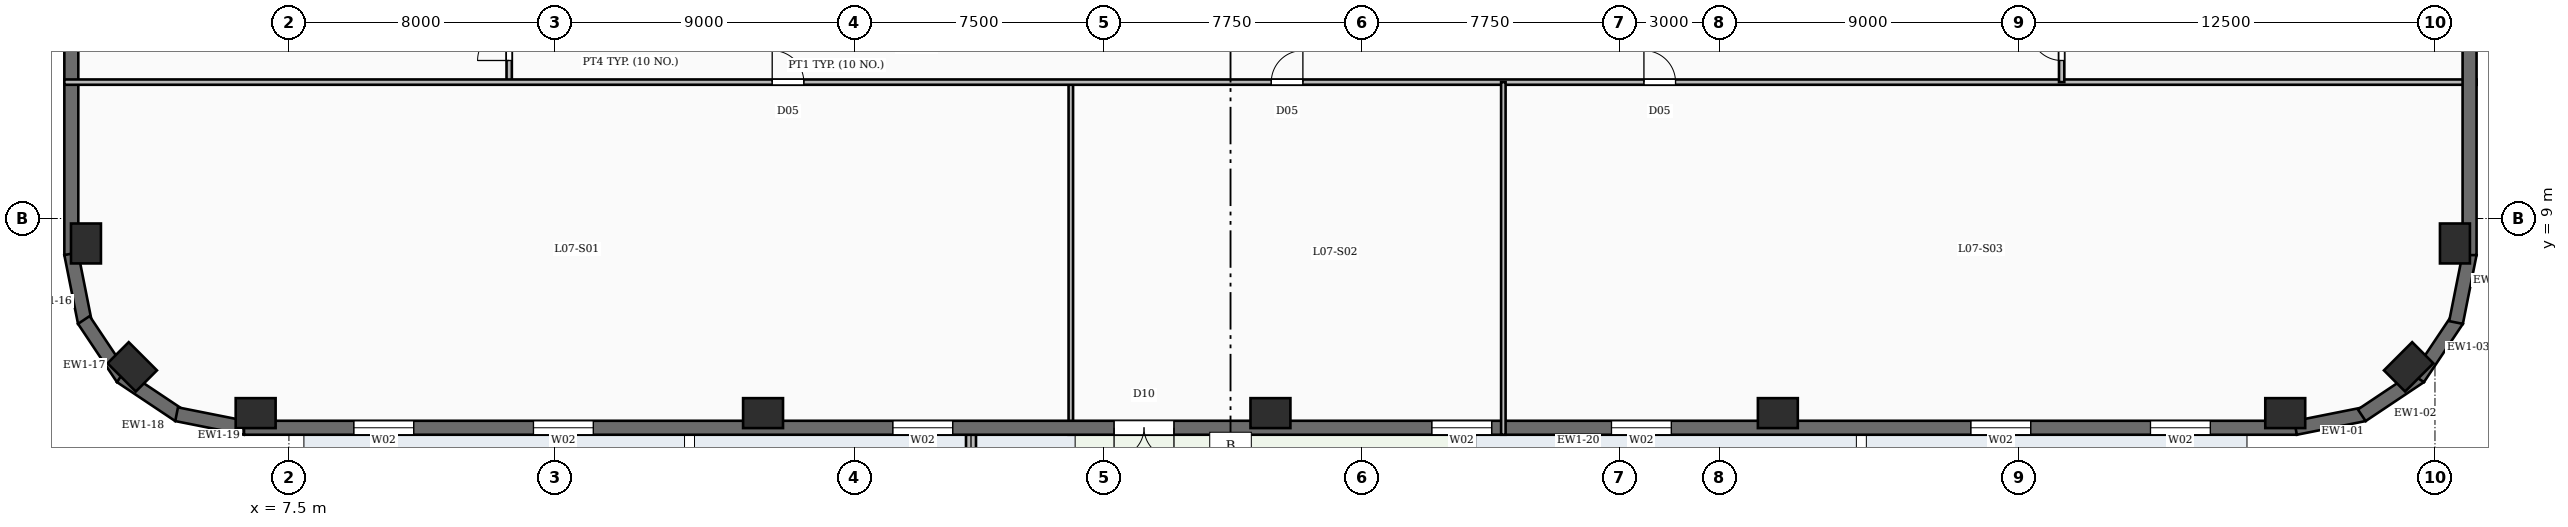
"""IFC4 building model, lengths in metres.
Left out: names, types, materials, properties, quantities, classifications, styles, units other than length and angle.
Written with IfcOpenShell. Run it as: python <this file> out.ifc"""

import sys

from ifc_helpers import new_model, si_unit, direction, frame, frame_2d, origin, origin_2d, place, context, subcontext, project, spatial, rectangle, extrude, element, fill, save


model = new_model("IFC4")
c1 = context("Model", 3, precision=1e-05, world=origin(), true_north=direction((0.0, 1.0)))
c2 = subcontext(c1, "Body", "Model", "MODEL_VIEW")
j1 = project(units=[si_unit("LENGTHUNIT", "METRE"), si_unit("PLANEANGLEUNIT", "RADIAN")], contexts=[c1])
p1 = place(None, origin())
s1 = spatial("IfcSite", under=j1, at=p1, CompositionType="ELEMENT")
p2 = place(p1, origin())
s2 = spatial("IfcBuilding", under=s1, at=p2, CompositionType="ELEMENT")
p3 = place(p2, frame((0.0, 0.0, 42.0)))
s3 = spatial("IfcBuildingStorey", under=s2, at=p3, CompositionType="ELEMENT", Elevation=42.0)
for number, where, z_axis, x_axis in (
    (1, (6.5, 3.15, -0.45), (0.0, 0.0, 1.0), (1.0, 0.0, 0.0)),
    (2, (21.75, 3.15, -0.45), (0.0, 0.0, 1.0), (1.0, 0.0, 0.0)),
    (3, (37.0, 3.15, -0.45), (0.0, 0.0, 1.0), (1.0, 0.0, 0.0)),
    (4, (52.25, 3.15, -0.45), (0.0, 0.0, 1.0), (1.0, 0.0, 0.0)),
    (5, (67.5, 3.15, -0.45), (0.0, 0.0, 1.0), (1.0, 0.0, 0.0)),
    (6, (71.209, 4.541, -0.45), (0.0, 0.0, 1.0), (0.707, 0.707, 0.0)),
    (7, (72.6, 8.25, -0.45), (0.0, 0.0, 1.0), (0.0, 1.0, 0.0)),
    (8, (1.4, 8.25, -0.45), (0.0, 0.0, 1.0), (0.0, 1.0, 0.0)),
    (9, (2.791, 4.541, -0.45), (0.0, 0.0, 1.0), (-0.707, 0.707, 0.0)),
):
    element("IfcColumn", number, at=place(p3, frame(where, z_axis=z_axis, x_axis=x_axis)), inside=s3, PredefinedType="COLUMN", context=c2, shape_type="SweptSolid", body=[
        extrude(rectangle(XDim=1.2, YDim=0.9, at=origin_2d()), origin(), (0.0, 0.0, 1.0), 3.93),
    ])
for number, where, z_axis, x_axis in (
    (10, (69.875, 3.117, 0.0), (0.0, 0.0, 1.0), (-0.981, -0.195, 0.0)),
    (11, (71.552, 4.256, 0.0), (0.0, 0.0, 1.0), (-0.832, -0.556, 0.0)),
    (12, (72.664, 5.95, 0.0), (0.0, 0.0, 1.0), (-0.556, -0.832, 0.0)),
    (13, (73.044, 7.941, 0.0), (0.0, 0.0, 1.0), (-0.195, -0.981, 0.0)),
):
    element("IfcWall", number, at=place(p3, frame(where, z_axis=z_axis, x_axis=x_axis)), inside=s3, PredefinedType="SOLIDWALL", context=c2, shape_type="SweptSolid", body=[
        extrude(rectangle(XDim=2.107, YDim=0.42, at=frame_2d((1.053, 0.0))), origin(), (0.0, 0.0, 1.0), 3.48),
    ])
p4 = place(p3, frame((73.04, 44.1, 0.0), z_axis=(0.0, 0.0, 1.0), x_axis=(0.0, -1.0, 0.0)))
e14 = element("IfcWall", 14, at=p4, inside=s3, PredefinedType="SOLIDWALL", context=c2, shape_type="SweptSolid", body=[
    extrude(rectangle(XDim=36.2, YDim=0.42, at=frame_2d((18.1, 0.0))), origin(), (0.0, 0.0, 1.0), 3.48),
])
p5 = place(p4, frame((4.2, 0.0, 0.88)))
e15 = element("IfcOpeningElement", 15, at=p5, cuts=e14, PredefinedType="OPENING", context=c2, shape_type="SweptSolid", body=[
    extrude(rectangle(XDim=1.35, YDim=2.2, at=frame_2d((0.675, 1.1))), frame((0.0, 0.22, 0.0), z_axis=(0.0, -1.0, 0.0), x_axis=(1.0, 0.0, 0.0)), (0.0, 0.0, 1.0), 0.44),
])
p6 = place(p4, frame((15.4, 0.0, 0.88)))
e16 = element("IfcOpeningElement", 16, at=p6, cuts=e14, PredefinedType="OPENING", context=c2, shape_type="SweptSolid", body=[
    extrude(rectangle(XDim=1.35, YDim=2.2, at=frame_2d((0.675, 1.1))), frame((0.0, 0.22, 0.0), z_axis=(0.0, -1.0, 0.0), x_axis=(1.0, 0.0, 0.0)), (0.0, 0.0, 1.0), 0.44),
])
p7 = place(p4, frame((21.0, 0.0, 0.88)))
e17 = element("IfcOpeningElement", 17, at=p7, cuts=e14, PredefinedType="OPENING", context=c2, shape_type="SweptSolid", body=[
    extrude(rectangle(XDim=1.35, YDim=2.2, at=frame_2d((0.675, 1.1))), frame((0.0, 0.22, 0.0), z_axis=(0.0, -1.0, 0.0), x_axis=(1.0, 0.0, 0.0)), (0.0, 0.0, 1.0), 0.44),
])
p8 = place(p4, frame((26.6, 0.0, 0.88)))
e18 = element("IfcOpeningElement", 18, at=p8, cuts=e14, PredefinedType="OPENING", context=c2, shape_type="SweptSolid", body=[
    extrude(rectangle(XDim=1.35, YDim=2.2, at=frame_2d((0.675, 1.1))), frame((0.0, 0.22, 0.0), z_axis=(0.0, -1.0, 0.0), x_axis=(1.0, 0.0, 0.0)), (0.0, 0.0, 1.0), 0.44),
])
p9 = place(p3, frame((0.96, 7.9, 0.0), z_axis=(0.0, 0.0, 1.0), x_axis=(0.0, 1.0, 0.0)))
e19 = element("IfcWall", 19, at=p9, inside=s3, PredefinedType="SOLIDWALL", context=c2, shape_type="SweptSolid", body=[
    extrude(rectangle(XDim=36.2, YDim=0.42, at=frame_2d((18.1, 0.0))), origin(), (0.0, 0.0, 1.0), 3.48),
])
p10 = place(p9, frame((15.4, 0.0, 0.88)))
e20 = element("IfcOpeningElement", 20, at=p10, cuts=e19, PredefinedType="OPENING", context=c2, shape_type="SweptSolid", body=[
    extrude(rectangle(XDim=1.35, YDim=2.2, at=frame_2d((0.675, 1.1))), frame((0.0, 0.22, 0.0), z_axis=(0.0, -1.0, 0.0), x_axis=(1.0, 0.0, 0.0)), (0.0, 0.0, 1.0), 0.44),
])
p11 = place(p9, frame((21.0, 0.0, 0.88)))
e21 = element("IfcOpeningElement", 21, at=p11, cuts=e19, PredefinedType="OPENING", context=c2, shape_type="SweptSolid", body=[
    extrude(rectangle(XDim=1.35, YDim=2.2, at=frame_2d((0.675, 1.1))), frame((0.0, 0.22, 0.0), z_axis=(0.0, -1.0, 0.0), x_axis=(1.0, 0.0, 0.0)), (0.0, 0.0, 1.0), 0.44),
])
p12 = place(p9, frame((26.6, 0.0, 0.88)))
e22 = element("IfcOpeningElement", 22, at=p12, cuts=e19, PredefinedType="OPENING", context=c2, shape_type="SweptSolid", body=[
    extrude(rectangle(XDim=1.35, YDim=2.2, at=frame_2d((0.675, 1.1))), frame((0.0, 0.22, 0.0), z_axis=(0.0, -1.0, 0.0), x_axis=(1.0, 0.0, 0.0)), (0.0, 0.0, 1.0), 0.44),
])
for number, where, z_axis, x_axis in (
    (23, (1.367, 5.875, 0.0), (0.0, 0.0, 1.0), (-0.195, 0.981, 0.0)),
    (24, (2.506, 4.198, 0.0), (0.0, 0.0, 1.0), (-0.556, 0.832, 0.0)),
    (25, (4.2, 3.086, 0.0), (0.0, 0.0, 1.0), (-0.832, 0.556, 0.0)),
    (26, (6.191, 2.706, 0.0), (0.0, 0.0, 1.0), (-0.981, 0.195, 0.0)),
):
    element("IfcWall", number, at=place(p3, frame(where, z_axis=z_axis, x_axis=x_axis)), inside=s3, PredefinedType="SOLIDWALL", context=c2, shape_type="SweptSolid", body=[
        extrude(rectangle(XDim=2.107, YDim=0.42, at=frame_2d((1.053, 0.0))), origin(), (0.0, 0.0, 1.0), 3.48),
    ])
p13 = place(p3, frame((67.85, 2.71, 0.0), z_axis=(0.0, 0.0, 1.0), x_axis=(-1.0, 0.0, 0.0)))
e27 = element("IfcWall", 27, at=p13, inside=s3, PredefinedType="SOLIDWALL", context=c2, shape_type="SweptSolid", body=[
    extrude(rectangle(XDim=61.7, YDim=0.42, at=frame_2d((30.85, 0.0))), origin(), (0.0, 0.0, 1.0), 3.48),
])
p14 = place(p13, frame((33.75, 0.0, 0.0)))
e28 = element("IfcOpeningElement", 28, at=p14, cuts=e27, PredefinedType="OPENING", context=c2, shape_type="SweptSolid", body=[
    extrude(rectangle(XDim=1.8, YDim=2.25, at=frame_2d((0.9, 1.125))), frame((0.0, 0.22, 0.0), z_axis=(0.0, -1.0, 0.0), x_axis=(1.0, 0.0, 0.0)), (0.0, 0.0, 1.0), 0.44),
])
p15 = place(p13, frame((2.6, 0.0, 0.88)))
e29 = element("IfcOpeningElement", 29, at=p15, cuts=e27, PredefinedType="OPENING", context=c2, shape_type="SweptSolid", body=[
    extrude(rectangle(XDim=1.8, YDim=2.15, at=frame_2d((0.9, 1.075))), frame((0.0, 0.22, 0.0), z_axis=(0.0, -1.0, 0.0), x_axis=(1.0, 0.0, 0.0)), (0.0, 0.0, 1.0), 0.44),
])
p16 = place(p13, frame((8.0, 0.0, 0.88)))
e30 = element("IfcOpeningElement", 30, at=p16, cuts=e27, PredefinedType="OPENING", context=c2, shape_type="SweptSolid", body=[
    extrude(rectangle(XDim=1.8, YDim=2.15, at=frame_2d((0.9, 1.075))), frame((0.0, 0.22, 0.0), z_axis=(0.0, -1.0, 0.0), x_axis=(1.0, 0.0, 0.0)), (0.0, 0.0, 1.0), 0.44),
])
p17 = place(p13, frame((18.8, 0.0, 0.88)))
e31 = element("IfcOpeningElement", 31, at=p17, cuts=e27, PredefinedType="OPENING", context=c2, shape_type="SweptSolid", body=[
    extrude(rectangle(XDim=1.8, YDim=2.15, at=frame_2d((0.9, 1.075))), frame((0.0, 0.22, 0.0), z_axis=(0.0, -1.0, 0.0), x_axis=(1.0, 0.0, 0.0)), (0.0, 0.0, 1.0), 0.44),
])
p18 = place(p13, frame((24.2, 0.0, 0.88)))
e32 = element("IfcOpeningElement", 32, at=p18, cuts=e27, PredefinedType="OPENING", context=c2, shape_type="SweptSolid", body=[
    extrude(rectangle(XDim=1.8, YDim=2.15, at=frame_2d((0.9, 1.075))), frame((0.0, 0.22, 0.0), z_axis=(0.0, -1.0, 0.0), x_axis=(1.0, 0.0, 0.0)), (0.0, 0.0, 1.0), 0.44),
])
p19 = place(p13, frame((40.4, 0.0, 0.88)))
e33 = element("IfcOpeningElement", 33, at=p19, cuts=e27, PredefinedType="OPENING", context=c2, shape_type="SweptSolid", body=[
    extrude(rectangle(XDim=1.8, YDim=2.15, at=frame_2d((0.9, 1.075))), frame((0.0, 0.22, 0.0), z_axis=(0.0, -1.0, 0.0), x_axis=(1.0, 0.0, 0.0)), (0.0, 0.0, 1.0), 0.44),
])
p20 = place(p13, frame((51.2, 0.0, 0.88)))
e34 = element("IfcOpeningElement", 34, at=p20, cuts=e27, PredefinedType="OPENING", context=c2, shape_type="SweptSolid", body=[
    extrude(rectangle(XDim=1.8, YDim=2.15, at=frame_2d((0.9, 1.075))), frame((0.0, 0.22, 0.0), z_axis=(0.0, -1.0, 0.0), x_axis=(1.0, 0.0, 0.0)), (0.0, 0.0, 1.0), 0.44),
])
p21 = place(p13, frame((56.6, 0.0, 0.88)))
e35 = element("IfcOpeningElement", 35, at=p21, cuts=e27, PredefinedType="OPENING", context=c2, shape_type="SweptSolid", body=[
    extrude(rectangle(XDim=1.8, YDim=2.15, at=frame_2d((0.9, 1.075))), frame((0.0, 0.22, 0.0), z_axis=(0.0, -1.0, 0.0), x_axis=(1.0, 0.0, 0.0)), (0.0, 0.0, 1.0), 0.44),
])
p22 = place(p3, frame((28.0, 2.5, 0.0), z_axis=(0.0, 0.0, 1.0), x_axis=(0.0, -1.0, 0.0)))
e36 = element("IfcWall", 36, at=p22, inside=s3, PredefinedType="PARAPET", context=c2, shape_type="SweptSolid", body=[
    extrude(rectangle(XDim=2.4, YDim=0.3, at=frame_2d((1.2, 0.0))), origin(), (0.0, 0.0, 1.0), 1.12),
])
for number, where, z_axis, x_axis in (
    (37, (31.0, 2.5, 0.0), (0.0, 0.0, 1.0), (0.0, 1.0, 0.0)),
    (38, (44.0, 2.5, 0.0), (0.0, 0.0, 1.0), (0.0, 1.0, 0.0)),
):
    element("IfcWall", number, at=place(p3, frame(where, z_axis=z_axis, x_axis=x_axis)), inside=s3, PredefinedType="PARTITIONING", context=c2, shape_type="SweptSolid", body=[
        extrude(rectangle(XDim=10.6, YDim=0.135, at=frame_2d((5.3, 0.0))), origin(), (0.0, 0.0, 1.0), 2.54),
    ])
p23 = place(p3, frame((0.75, 13.1, 0.0), z_axis=(0.0, 0.0, 1.0), x_axis=(1.0, 0.0, 0.0)))
e39 = element("IfcWall", 39, at=p23, inside=s3, PredefinedType="PARTITIONING", context=c2, shape_type="SweptSolid", body=[
    extrude(rectangle(XDim=72.5, YDim=0.16, at=frame_2d((36.25, 0.0))), origin(), (0.0, 0.0, 1.0), 2.54),
])
p24 = place(p23, frame((21.275, 0.0, 0.0)))
e40 = element("IfcOpeningElement", 40, at=p24, cuts=e39, PredefinedType="OPENING", context=c2, shape_type="SweptSolid", body=[
    extrude(rectangle(XDim=0.95, YDim=2.15, at=frame_2d((0.475, 1.075))), frame((0.0, 0.09, 0.0), z_axis=(0.0, -1.0, 0.0), x_axis=(1.0, 0.0, 0.0)), (0.0, 0.0, 1.0), 0.18),
])
p25 = place(p23, frame((36.275, 0.0, 0.0)))
e41 = element("IfcOpeningElement", 41, at=p25, cuts=e39, PredefinedType="OPENING", context=c2, shape_type="SweptSolid", body=[
    extrude(rectangle(XDim=0.95, YDim=2.15, at=frame_2d((0.475, 1.075))), frame((0.0, 0.09, 0.0), z_axis=(0.0, -1.0, 0.0), x_axis=(1.0, 0.0, 0.0)), (0.0, 0.0, 1.0), 0.18),
])
p26 = place(p23, frame((47.475, 0.0, 0.0)))
e42 = element("IfcOpeningElement", 42, at=p26, cuts=e39, PredefinedType="OPENING", context=c2, shape_type="SweptSolid", body=[
    extrude(rectangle(XDim=0.95, YDim=2.15, at=frame_2d((0.475, 1.075))), frame((0.0, 0.09, 0.0), z_axis=(0.0, -1.0, 0.0), x_axis=(1.0, 0.0, 0.0)), (0.0, 0.0, 1.0), 0.18),
])
p27 = place(p3, frame((14.12, 13.1, 0.0), z_axis=(0.0, 0.0, 1.0), x_axis=(0.0, 1.0, 0.0)))
e43 = element("IfcWall", 43, at=p27, inside=s3, PredefinedType="PARTITIONING", context=c2, shape_type="SweptSolid", body=[
    extrude(rectangle(XDim=2.3, YDim=0.16, at=frame_2d((1.15, 0.0))), origin(), (0.0, 0.0, 1.0), 2.54),
])
p28 = place(p27, frame((0.65, 0.0, 0.0)))
e44 = element("IfcOpeningElement", 44, at=p28, cuts=e43, PredefinedType="OPENING", context=c2, shape_type="SweptSolid", body=[
    extrude(rectangle(XDim=0.95, YDim=2.15, at=frame_2d((0.475, 1.075))), frame((0.0, 0.09, 0.0), z_axis=(0.0, -1.0, 0.0), x_axis=(1.0, 0.0, 0.0)), (0.0, 0.0, 1.0), 0.18),
])
p29 = place(p3, frame((60.78, 13.1, 0.0), z_axis=(0.0, 0.0, 1.0), x_axis=(0.0, 1.0, 0.0)))
e45 = element("IfcWall", 45, at=p29, inside=s3, PredefinedType="PARTITIONING", context=c2, shape_type="SweptSolid", body=[
    extrude(rectangle(XDim=2.3, YDim=0.16, at=frame_2d((1.15, 0.0))), origin(), (0.0, 0.0, 1.0), 2.54),
])
p30 = place(p29, frame((0.65, 0.0, 0.0)))
e46 = element("IfcOpeningElement", 46, at=p30, cuts=e45, PredefinedType="OPENING", context=c2, shape_type="SweptSolid", body=[
    extrude(rectangle(XDim=0.95, YDim=2.15, at=frame_2d((0.475, 1.075))), frame((0.0, 0.09, 0.0), z_axis=(0.0, -1.0, 0.0), x_axis=(1.0, 0.0, 0.0)), (0.0, 0.0, 1.0), 0.18),
])
p31 = place(p14, origin())
e47 = element("IfcDoor", 47, at=p31, inside=s3, OperationType="DOUBLE_DOOR_SINGLE_SWING", PredefinedType="DOOR", context=c2, shape_type="SweptSolid", body=[
    extrude(rectangle(XDim=1.8, YDim=2.25, at=frame_2d((0.9, 1.125))), frame((0.0, 0.025, 0.0), z_axis=(0.0, -1.0, 0.0), x_axis=(1.0, 0.0, 0.0)), (0.0, 0.0, 1.0), 0.05),
])
fill(e28, e47)
p32 = place(p15, origin())
e48 = element("IfcWindow", 48, at=p32, inside=s3, PartitioningType="DOUBLE_PANEL_VERTICAL", PredefinedType="WINDOW", context=c2, shape_type="SweptSolid", body=[
    extrude(rectangle(XDim=1.8, YDim=2.15, at=frame_2d((0.9, 1.075))), frame((0.0, 0.03, 0.0), z_axis=(0.0, -1.0, 0.0), x_axis=(1.0, 0.0, 0.0)), (0.0, 0.0, 1.0), 0.06),
])
fill(e29, e48)
p33 = place(p16, origin())
e49 = element("IfcWindow", 49, at=p33, inside=s3, PartitioningType="DOUBLE_PANEL_VERTICAL", PredefinedType="WINDOW", context=c2, shape_type="SweptSolid", body=[
    extrude(rectangle(XDim=1.8, YDim=2.15, at=frame_2d((0.9, 1.075))), frame((0.0, 0.03, 0.0), z_axis=(0.0, -1.0, 0.0), x_axis=(1.0, 0.0, 0.0)), (0.0, 0.0, 1.0), 0.06),
])
fill(e30, e49)
p34 = place(p17, origin())
e50 = element("IfcWindow", 50, at=p34, inside=s3, PartitioningType="DOUBLE_PANEL_VERTICAL", PredefinedType="WINDOW", context=c2, shape_type="SweptSolid", body=[
    extrude(rectangle(XDim=1.8, YDim=2.15, at=frame_2d((0.9, 1.075))), frame((0.0, 0.03, 0.0), z_axis=(0.0, -1.0, 0.0), x_axis=(1.0, 0.0, 0.0)), (0.0, 0.0, 1.0), 0.06),
])
fill(e31, e50)
p35 = place(p18, origin())
e51 = element("IfcWindow", 51, at=p35, inside=s3, PartitioningType="DOUBLE_PANEL_VERTICAL", PredefinedType="WINDOW", context=c2, shape_type="SweptSolid", body=[
    extrude(rectangle(XDim=1.8, YDim=2.15, at=frame_2d((0.9, 1.075))), frame((0.0, 0.03, 0.0), z_axis=(0.0, -1.0, 0.0), x_axis=(1.0, 0.0, 0.0)), (0.0, 0.0, 1.0), 0.06),
])
fill(e32, e51)
p36 = place(p19, origin())
e52 = element("IfcWindow", 52, at=p36, inside=s3, PartitioningType="DOUBLE_PANEL_VERTICAL", PredefinedType="WINDOW", context=c2, shape_type="SweptSolid", body=[
    extrude(rectangle(XDim=1.8, YDim=2.15, at=frame_2d((0.9, 1.075))), frame((0.0, 0.03, 0.0), z_axis=(0.0, -1.0, 0.0), x_axis=(1.0, 0.0, 0.0)), (0.0, 0.0, 1.0), 0.06),
])
fill(e33, e52)
p37 = place(p20, origin())
e53 = element("IfcWindow", 53, at=p37, inside=s3, PartitioningType="DOUBLE_PANEL_VERTICAL", PredefinedType="WINDOW", context=c2, shape_type="SweptSolid", body=[
    extrude(rectangle(XDim=1.8, YDim=2.15, at=frame_2d((0.9, 1.075))), frame((0.0, 0.03, 0.0), z_axis=(0.0, -1.0, 0.0), x_axis=(1.0, 0.0, 0.0)), (0.0, 0.0, 1.0), 0.06),
])
fill(e34, e53)
p38 = place(p21, origin())
e54 = element("IfcWindow", 54, at=p38, inside=s3, PartitioningType="DOUBLE_PANEL_VERTICAL", PredefinedType="WINDOW", context=c2, shape_type="SweptSolid", body=[
    extrude(rectangle(XDim=1.8, YDim=2.15, at=frame_2d((0.9, 1.075))), frame((0.0, 0.03, 0.0), z_axis=(0.0, -1.0, 0.0), x_axis=(1.0, 0.0, 0.0)), (0.0, 0.0, 1.0), 0.06),
])
fill(e35, e54)
p39 = place(p24, origin())
e55 = element("IfcDoor", 55, at=p39, inside=s3, OperationType="SINGLE_SWING_LEFT", PredefinedType="DOOR", context=c2, shape_type="SweptSolid", body=[
    extrude(rectangle(XDim=0.95, YDim=2.15, at=frame_2d((0.475, 1.075))), frame((0.0, 0.025, 0.0), z_axis=(0.0, -1.0, 0.0), x_axis=(1.0, 0.0, 0.0)), (0.0, 0.0, 1.0), 0.05),
])
fill(e40, e55)
p40 = place(p25, origin())
e56 = element("IfcDoor", 56, at=p40, inside=s3, OperationType="SINGLE_SWING_RIGHT", PredefinedType="DOOR", context=c2, shape_type="SweptSolid", body=[
    extrude(rectangle(XDim=0.95, YDim=2.15, at=frame_2d((0.475, 1.075))), frame((0.0, 0.025, 0.0), z_axis=(0.0, -1.0, 0.0), x_axis=(1.0, 0.0, 0.0)), (0.0, 0.0, 1.0), 0.05),
])
fill(e41, e56)
p41 = place(p26, origin())
e57 = element("IfcDoor", 57, at=p41, inside=s3, OperationType="SINGLE_SWING_LEFT", PredefinedType="DOOR", context=c2, shape_type="SweptSolid", body=[
    extrude(rectangle(XDim=0.95, YDim=2.15, at=frame_2d((0.475, 1.075))), frame((0.0, 0.025, 0.0), z_axis=(0.0, -1.0, 0.0), x_axis=(1.0, 0.0, 0.0)), (0.0, 0.0, 1.0), 0.05),
])
fill(e42, e57)
p42 = place(p28, origin())
e58 = element("IfcDoor", 58, at=p42, inside=s3, OperationType="SINGLE_SWING_LEFT", PredefinedType="DOOR", context=c2, shape_type="SweptSolid", body=[
    extrude(rectangle(XDim=0.95, YDim=2.15, at=frame_2d((0.475, 1.075))), frame((0.0, 0.025, 0.0), z_axis=(0.0, -1.0, 0.0), x_axis=(1.0, 0.0, 0.0)), (0.0, 0.0, 1.0), 0.05),
])
fill(e44, e58)
p43 = place(p30, origin())
e59 = element("IfcDoor", 59, at=p43, inside=s3, OperationType="SINGLE_SWING_RIGHT", PredefinedType="DOOR", context=c2, shape_type="SweptSolid", body=[
    extrude(rectangle(XDim=0.95, YDim=2.15, at=frame_2d((0.475, 1.075))), frame((0.0, 0.025, 0.0), z_axis=(0.0, -1.0, 0.0), x_axis=(1.0, 0.0, 0.0)), (0.0, 0.0, 1.0), 0.05),
])
fill(e46, e59)
save(model, sys.argv[1])
